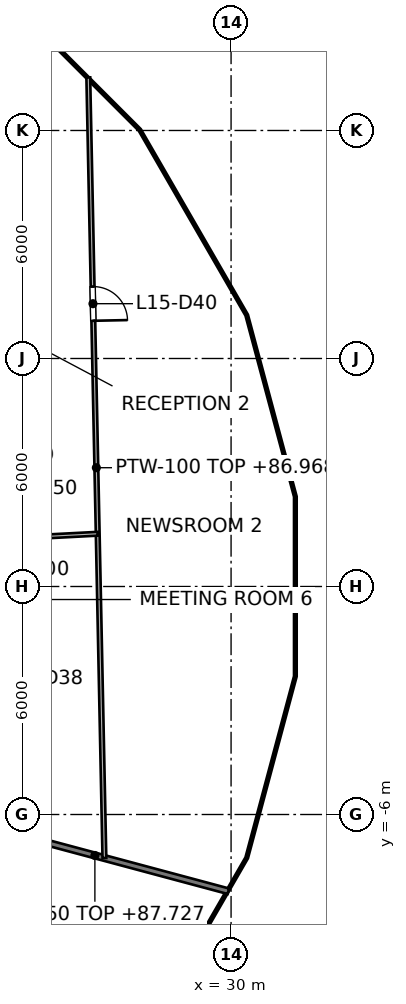
"""IFC4 building model, lengths in metres.
Left out: names, types, materials, properties, quantities, classifications, styles, units other than length and angle.
Written with IfcOpenShell. Run it as: python <this file> out.ifc"""

import sys

from ifc_helpers import new_model, si_unit, direction, frame, frame_2d, origin, place, context, subcontext, project, spatial, rectangle, extrude, element, fill, save


model = new_model("IFC4")
c1 = context("Model", 3, precision=1e-05, world=origin(), true_north=direction((0.0, 1.0)))
c2 = subcontext(c1, "Body", "Model", "MODEL_VIEW")
j1 = project(units=[si_unit("LENGTHUNIT", "METRE"), si_unit("PLANEANGLEUNIT", "RADIAN")], contexts=[c1])
p1 = place(None, origin())
s1 = spatial("IfcSite", under=j1, at=p1, CompositionType="ELEMENT")
p2 = place(p1, origin())
s2 = spatial("IfcBuilding", under=s1, at=p2, CompositionType="ELEMENT")
p3 = place(p2, frame((0.0, 0.0, 84.0)))
s3 = spatial("IfcBuildingStorey", under=s2, at=p3, CompositionType="ELEMENT", Elevation=84.0)
p4 = place(p3, frame((22.905, -6.137, 0.0), z_axis=(0.0, 0.0, 1.0), x_axis=(0.965915974273, -0.258855810529, 0.0)))
e1 = element("IfcWall", 1, at=p4, inside=s3, PredefinedType="PARTITIONING", context=c2, shape_type="SweptSolid", body=[
    extrude(rectangle(XDim=7.271, YDim=0.15, at=frame_2d((3.635, 0.0))), origin(), (0.0, 0.0, 1.0), 3.727),
])
p5 = place(p3, frame((26.243, 13.397, 0.0), z_axis=(0.0, 0.0, 1.0), x_axis=(0.020639766813, -0.999786977324, 0.0)))
e2 = element("IfcWall", 2, at=p5, inside=s3, PredefinedType="PARTITIONING", context=c2, shape_type="SweptSolid", body=[
    extrude(rectangle(XDim=20.546, YDim=0.1, at=frame_2d((10.273, 0.0))), origin(), (0.0, 0.0, 1.0), 2.968),
])
p6 = place(p5, frame((5.506, 0.0, 0.0)))
e3 = element("IfcOpeningElement", 3, at=p6, cuts=e2, PredefinedType="OPENING", context=c2, shape_type="SweptSolid", body=[
    extrude(rectangle(XDim=0.9, YDim=2.1, at=frame_2d((0.45, 1.05))), frame((0.0, 0.05, 0.0), z_axis=(0.0, -1.0, 0.0), x_axis=(1.0, 0.0, 0.0)), (0.0, 0.0, 1.0), 0.1),
])
p7 = place(p3, frame((22.754, 1.193, 0.0), z_axis=(0.0, 0.0, 1.0), x_axis=(0.998643838338, 0.05206231025, 0.0)))
e4 = element("IfcWall", 4, at=p7, inside=s3, PredefinedType="PARTITIONING", context=c2, shape_type="SweptSolid", body=[
    extrude(rectangle(XDim=3.742, YDim=0.1, at=frame_2d((1.871, 0.0))), origin(), (0.0, 0.0, 1.0), 3.9),
])
p8 = place(p6, origin())
e5 = element("IfcDoor", 5, at=p8, inside=s3, OperationType="SINGLE_SWING_RIGHT", PredefinedType="DOOR", context=c2, shape_type="SweptSolid", body=[
    extrude(rectangle(XDim=0.9, YDim=2.1, at=frame_2d((0.45, 1.05))), frame((0.0, 0.025, 0.0), z_axis=(0.0, -1.0, 0.0), x_axis=(1.0, 0.0, 0.0)), (0.0, 0.0, 1.0), 0.05),
])
fill(e3, e5)
save(model, sys.argv[1])
